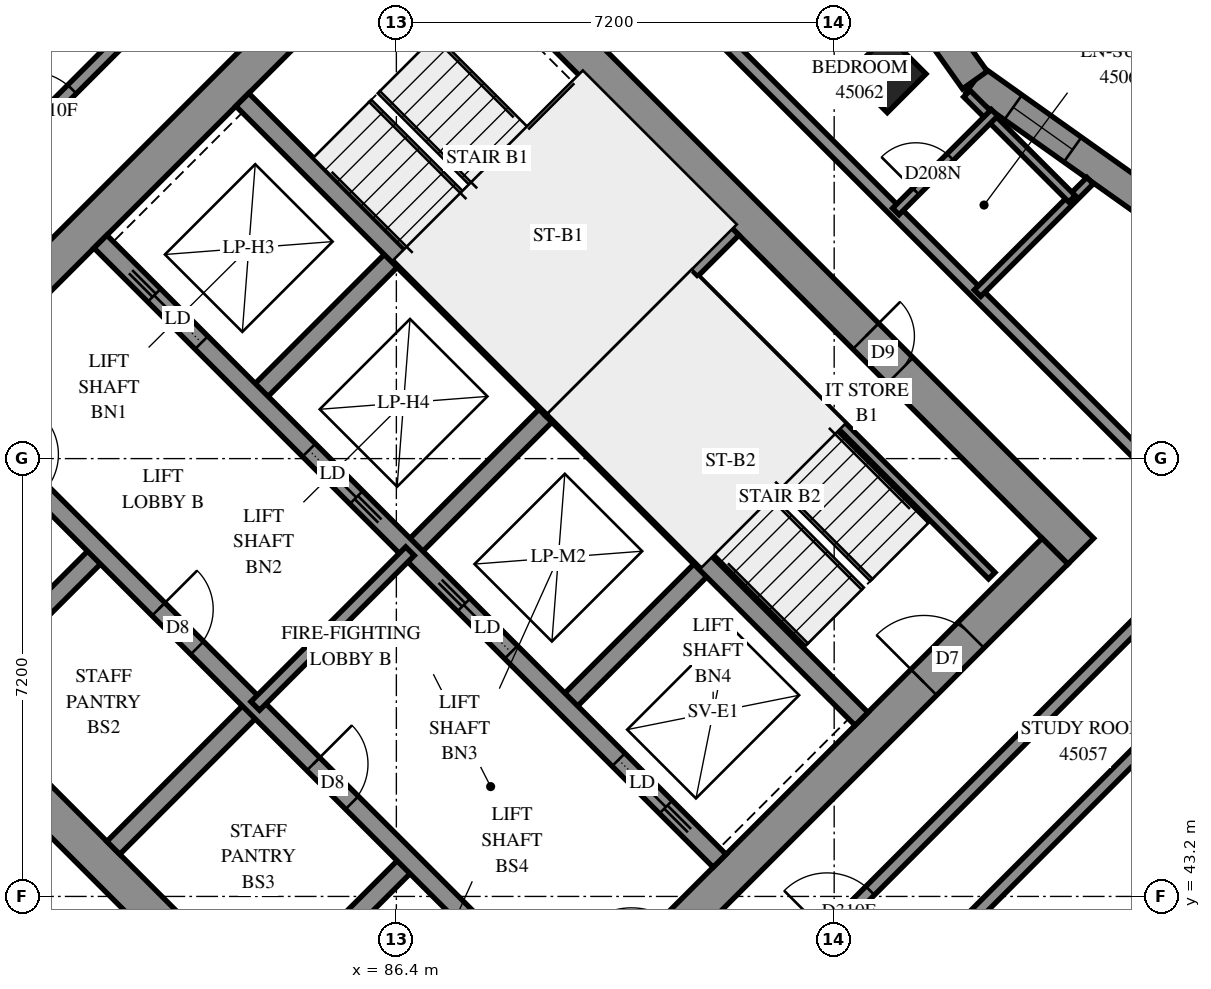
"""IFC4 building model, lengths in metres.
Left out: names, types, materials, properties, quantities, classifications, styles, units other than length and angle.
Written with IfcOpenShell. Run it as: python <this file> out.ifc"""

import sys

from ifc_helpers import new_model, si_unit, direction, frame, frame_2d, origin, origin_2d, place, context, subcontext, project, spatial, polyline, rectangle, outline, extrude, element, fill, save


model = new_model("IFC4")
c1 = context("Model", 3, precision=1e-05, world=origin(), true_north=direction((0.0, 1.0)))
c2 = subcontext(c1, "Body", "Model", "MODEL_VIEW")
j1 = project(units=[si_unit("LENGTHUNIT", "METRE"), si_unit("PLANEANGLEUNIT", "RADIAN")], contexts=[c1])
p1 = place(None, origin())
s1 = spatial("IfcSite", under=j1, at=p1, CompositionType="ELEMENT")
p2 = place(p1, origin())
s2 = spatial("IfcBuilding", under=s1, at=p2, CompositionType="ELEMENT")
p3 = place(p2, frame((0.0, 0.0, 166.0)))
s3 = spatial("IfcBuildingStorey", under=s2, at=p3, CompositionType="ELEMENT", Elevation=166.0)
p4 = place(p3, frame((94.474, 56.727, 0.0), z_axis=(0.0, 0.0, 1.0), x_axis=(0.7071067812, -0.7071067812, 0.0)))
e1 = element("IfcColumn", 1, at=p4, inside=s3, PredefinedType="COLUMN", context=c2, shape_type="SweptSolid", body=[
    extrude(rectangle(XDim=0.9, YDim=0.9, at=origin_2d()), origin(), (0.0, 0.0, 1.0), 3.1),
])
p5 = place(p3, frame((76.018, 49.302, -0.3), z_axis=(0.0, 0.0, 1.0), x_axis=(0.7071067812, -0.7071067812, 0.0)))
e2 = element("IfcWall", 2, at=p5, inside=s3, PredefinedType="SHEAR", context=c2, shape_type="SweptSolid", body=[
    extrude(rectangle(XDim=15.6, YDim=0.6, at=frame_2d((7.8, 0.0))), origin(), (0.0, 0.0, 1.0), 2.7),
])
p6 = place(p3, frame((86.625, 59.908, -0.3), z_axis=(0.0, 0.0, 1.0), x_axis=(0.7071067812, -0.7071067812, 0.0)))
e3 = element("IfcWall", 3, at=p6, inside=s3, PredefinedType="SHEAR", context=c2, shape_type="SweptSolid", body=[
    extrude(rectangle(XDim=15.6, YDim=0.6, at=frame_2d((7.8, 0.0))), origin(), (0.0, 0.0, 1.0), 2.7),
])
p7 = place(p6, frame((10.6, 0.0, 0.3)))
e4 = element("IfcOpeningElement", 4, at=p7, cuts=e3, PredefinedType="OPENING", context=c2, shape_type="SweptSolid", body=[
    extrude(rectangle(XDim=0.8, YDim=2.1, at=frame_2d((0.4, 1.05))), frame((0.0, 0.31, 0.0), z_axis=(0.0, -1.0, 0.0), x_axis=(1.0, 0.0, 0.0)), (0.0, 0.0, 1.0), 0.62),
])
p8 = place(p3, frame((76.442, 49.302, -0.3), z_axis=(0.0, 0.0, 1.0), x_axis=(0.7071067812, 0.7071067812, 0.0)))
e5 = element("IfcWall", 5, at=p8, inside=s3, PredefinedType="SHEAR", context=c2, shape_type="SweptSolid", body=[
    extrude(rectangle(XDim=14.4, YDim=0.6, at=frame_2d((7.2, 0.0))), origin(), (0.0, 0.0, 1.0), 2.7),
])
p9 = place(p8, frame((4.55, 0.0, 0.3)))
e6 = element("IfcOpeningElement", 6, at=p9, cuts=e5, PredefinedType="OPENING", context=c2, shape_type="SweptSolid", body=[
    extrude(rectangle(XDim=1.1, YDim=2.1, at=frame_2d((0.55, 1.05))), frame((0.0, 0.31, 0.0), z_axis=(0.0, -1.0, 0.0), x_axis=(1.0, 0.0, 0.0)), (0.0, 0.0, 1.0), 0.62),
])
p10 = place(p8, frame((11.35, 0.0, 0.3)))
e7 = element("IfcOpeningElement", 7, at=p10, cuts=e5, PredefinedType="OPENING", context=c2, shape_type="SweptSolid", body=[
    extrude(rectangle(XDim=1.1, YDim=2.1, at=frame_2d((0.55, 1.05))), frame((0.0, 0.31, 0.0), z_axis=(0.0, -1.0, 0.0), x_axis=(1.0, 0.0, 0.0)), (0.0, 0.0, 1.0), 0.62),
])
p11 = place(p3, frame((87.049, 38.695, -0.3), z_axis=(0.0, 0.0, 1.0), x_axis=(0.7071067812, 0.7071067812, 0.0)))
e8 = element("IfcWall", 8, at=p11, inside=s3, PredefinedType="SHEAR", context=c2, shape_type="SweptSolid", body=[
    extrude(rectangle(XDim=14.4, YDim=0.6, at=frame_2d((7.2, 0.0))), origin(), (0.0, 0.0, 1.0), 2.7),
])
p12 = place(p11, frame((4.55, 0.0, 0.3)))
e9 = element("IfcOpeningElement", 9, at=p12, cuts=e8, PredefinedType="OPENING", context=c2, shape_type="SweptSolid", body=[
    extrude(rectangle(XDim=1.1, YDim=2.1, at=frame_2d((0.55, 1.05))), frame((0.0, 0.31, 0.0), z_axis=(0.0, -1.0, 0.0), x_axis=(1.0, 0.0, 0.0)), (0.0, 0.0, 1.0), 0.62),
])
p13 = place(p11, frame((11.35, 0.0, 0.3)))
e10 = element("IfcOpeningElement", 10, at=p13, cuts=e8, PredefinedType="OPENING", context=c2, shape_type="SweptSolid", body=[
    extrude(rectangle(XDim=1.1, YDim=2.1, at=frame_2d((0.55, 1.05))), frame((0.0, 0.31, 0.0), z_axis=(0.0, -1.0, 0.0), x_axis=(1.0, 0.0, 0.0)), (0.0, 0.0, 1.0), 0.62),
])
for number, where, z_axis, x_axis in (
    (11, (79.2, 46.544, 0.0), (0.0, 0.0, 1.0), (0.707, 0.707, 0.0)),
    (12, (84.079, 51.423, 0.0), (0.0, 0.0, 1.0), (0.707, 0.707, 0.0)),
):
    element("IfcWall", number, at=place(p3, frame(where, z_axis=z_axis, x_axis=x_axis)), inside=s3, PredefinedType="SOLIDWALL", context=c2, shape_type="SweptSolid", body=[
        extrude(rectangle(XDim=3.3, YDim=0.3, at=frame_2d((1.65, 0.0))), origin(), (0.0, 0.0, 1.0), 3.1),
    ])
p14 = place(p3, frame((81.746, 43.999, 0.0), z_axis=(0.0, 0.0, 1.0), x_axis=(0.7071067812, 0.7071067812, 0.0)))
e13 = element("IfcWall", 13, at=p14, inside=s3, PredefinedType="SOLIDWALL", context=c2, shape_type="SweptSolid", body=[
    extrude(rectangle(XDim=3.3, YDim=0.3, at=frame_2d((1.65, 0.0))), origin(), (0.0, 0.0, 1.0), 3.1),
])
p15 = place(p3, frame((86.625, 48.878, 0.0), z_axis=(0.0, 0.0, 1.0), x_axis=(0.7071067812, 0.7071067812, 0.0)))
e14 = element("IfcWall", 14, at=p15, inside=s3, PredefinedType="SOLIDWALL", context=c2, shape_type="SweptSolid", body=[
    extrude(rectangle(XDim=3.3, YDim=0.3, at=frame_2d((1.65, 0.0))), origin(), (0.0, 0.0, 1.0), 3.1),
])
p16 = place(p3, frame((84.291, 41.453, 0.0), z_axis=(0.0, 0.0, 1.0), x_axis=(0.7071067812, 0.7071067812, 0.0)))
e15 = element("IfcWall", 15, at=p16, inside=s3, PredefinedType="SOLIDWALL", context=c2, shape_type="SweptSolid", body=[
    extrude(rectangle(XDim=3.3, YDim=0.3, at=frame_2d((1.65, 0.0))), origin(), (0.0, 0.0, 1.0), 3.1),
])
p17 = place(p3, frame((89.17, 46.332, 0.0), z_axis=(0.0, 0.0, 1.0), x_axis=(0.7071067812, 0.7071067812, 0.0)))
e16 = element("IfcWall", 16, at=p17, inside=s3, PredefinedType="SOLIDWALL", context=c2, shape_type="SweptSolid", body=[
    extrude(rectangle(XDim=3.3, YDim=0.3, at=frame_2d((1.65, 0.0))), origin(), (0.0, 0.0, 1.0), 3.1),
])
p18 = place(p3, frame((78.988, 51.423, 0.0), z_axis=(0.0, 0.0, 1.0), x_axis=(0.7071067812, -0.7071067812, 0.0)))
e17 = element("IfcWall", 17, at=p18, inside=s3, PredefinedType="SOLIDWALL", context=c2, shape_type="SweptSolid", body=[
    extrude(rectangle(XDim=14.4, YDim=0.3, at=frame_2d((7.2, 0.0))), origin(), (0.0, 0.0, 1.0), 3.1),
])
p19 = place(p18, frame((1.35, 0.0, 0.0)))
e18 = element("IfcOpeningElement", 18, at=p19, cuts=e17, PredefinedType="OPENING", context=c2, shape_type="SweptSolid", body=[
    extrude(rectangle(XDim=0.9, YDim=2.1, at=frame_2d((0.45, 1.05))), frame((0.0, 0.16, 0.0), z_axis=(0.0, -1.0, 0.0), x_axis=(1.0, 0.0, 0.0)), (0.0, 0.0, 1.0), 0.32),
])
p20 = place(p18, frame((4.95, 0.0, 0.0)))
e19 = element("IfcOpeningElement", 19, at=p20, cuts=e17, PredefinedType="OPENING", context=c2, shape_type="SweptSolid", body=[
    extrude(rectangle(XDim=0.9, YDim=2.1, at=frame_2d((0.45, 1.05))), frame((0.0, 0.16, 0.0), z_axis=(0.0, -1.0, 0.0), x_axis=(1.0, 0.0, 0.0)), (0.0, 0.0, 1.0), 0.32),
])
p21 = place(p18, frame((8.55, 0.0, 0.0)))
e20 = element("IfcOpeningElement", 20, at=p21, cuts=e17, PredefinedType="OPENING", context=c2, shape_type="SweptSolid", body=[
    extrude(rectangle(XDim=0.9, YDim=2.1, at=frame_2d((0.45, 1.05))), frame((0.0, 0.16, 0.0), z_axis=(0.0, -1.0, 0.0), x_axis=(1.0, 0.0, 0.0)), (0.0, 0.0, 1.0), 0.32),
])
p22 = place(p18, frame((12.05, 0.0, 0.0)))
e21 = element("IfcOpeningElement", 21, at=p22, cuts=e17, PredefinedType="OPENING", context=c2, shape_type="SweptSolid", body=[
    extrude(rectangle(XDim=1.1, YDim=2.1, at=frame_2d((0.55, 1.05))), frame((0.0, 0.16, 0.0), z_axis=(0.0, -1.0, 0.0), x_axis=(1.0, 0.0, 0.0)), (0.0, 0.0, 1.0), 0.32),
])
p23 = place(p3, frame((81.534, 53.969, 0.0), z_axis=(0.0, 0.0, 1.0), x_axis=(0.707103309, -0.7071102534, 0.0)))
e22 = element("IfcWall", 22, at=p23, inside=s3, PredefinedType="SOLIDWALL", context=c2, shape_type="SweptSolid", body=[
    extrude(rectangle(XDim=14.4, YDim=0.3, at=frame_2d((7.2, 0.0))), origin(), (0.0, 0.0, 1.0), 3.1),
])
p24 = place(p23, frame((1.25, 0.0, 0.0)))
e23 = element("IfcOpeningElement", 23, at=p24, cuts=e22, PredefinedType="OPENING", context=c2, shape_type="SweptSolid", body=[
    extrude(rectangle(XDim=1.1, YDim=2.1, at=frame_2d((0.55, 1.05))), frame((0.0, 0.16, 0.0), z_axis=(0.0, -1.0, 0.0), x_axis=(1.0, 0.0, 0.0)), (0.0, 0.0, 1.0), 0.32),
])
p25 = place(p23, frame((4.85, 0.0, 0.0)))
e24 = element("IfcOpeningElement", 24, at=p25, cuts=e22, PredefinedType="OPENING", context=c2, shape_type="SweptSolid", body=[
    extrude(rectangle(XDim=1.1, YDim=2.1, at=frame_2d((0.55, 1.05))), frame((0.0, 0.16, 0.0), z_axis=(0.0, -1.0, 0.0), x_axis=(1.0, 0.0, 0.0)), (0.0, 0.0, 1.0), 0.32),
])
p26 = place(p23, frame((8.45, 0.0, 0.0)))
e25 = element("IfcOpeningElement", 25, at=p26, cuts=e22, PredefinedType="OPENING", context=c2, shape_type="SweptSolid", body=[
    extrude(rectangle(XDim=1.1, YDim=2.1, at=frame_2d((0.55, 1.05))), frame((0.0, 0.16, 0.0), z_axis=(0.0, -1.0, 0.0), x_axis=(1.0, 0.0, 0.0)), (0.0, 0.0, 1.0), 0.32),
])
p27 = place(p23, frame((12.05, 0.0, 0.0)))
e26 = element("IfcOpeningElement", 26, at=p27, cuts=e22, PredefinedType="OPENING", context=c2, shape_type="SweptSolid", body=[
    extrude(rectangle(XDim=1.1, YDim=2.1, at=frame_2d((0.55, 1.05))), frame((0.0, 0.16, 0.0), z_axis=(0.0, -1.0, 0.0), x_axis=(1.0, 0.0, 0.0)), (0.0, 0.0, 1.0), 0.32),
])
for number, where, z_axis, x_axis in (
    (27, (83.867, 56.302, 0.0), (0.0, 0.0, 1.0), (0.707, -0.707, 0.0)),
    (28, (88.958, 51.211, 0.0), (0.0, 0.0, 1.0), (0.707, -0.707, 0.0)),
):
    element("IfcWall", number, at=place(p3, frame(where, z_axis=z_axis, x_axis=x_axis)), inside=s3, PredefinedType="SOLIDWALL", context=c2, shape_type="SweptSolid", body=[
        extrude(rectangle(XDim=7.2, YDim=0.3, at=frame_2d((3.6, 0.0))), origin(), (0.0, 0.0, 1.0), 3.1),
    ])
p28 = place(p3, frame((88.958, 51.211, 0.0), z_axis=(0.0, 0.0, 1.0), x_axis=(0.7071067812, 0.7071067812, 0.0)))
e29 = element("IfcWall", 29, at=p28, inside=s3, PredefinedType="SOLIDWALL", context=c2, shape_type="SweptSolid", body=[
    extrude(rectangle(XDim=4.2, YDim=0.3, at=frame_2d((2.1, 0.0))), origin(), (0.0, 0.0, 1.0), 3.1),
])
p29 = place(p3, frame((98.71, 54.638, 0.0), z_axis=(0.0, 0.0, 1.0), x_axis=(-0.8151376585, 0.5792672938, 0.0)))
e30 = element("IfcWall", 30, at=p29, inside=s3, PredefinedType="SOLIDWALL", context=c2, shape_type="SweptSolid", body=[
    extrude(outline(polyline([(-0.042, -0.25), (3.388, -0.25), (3.472, 0.25), (0.042, 0.25), (-0.042, -0.25)])), origin(), (0.0, 0.0, 1.0), 3.1),
])
p30 = place(p29, frame((1.457, 0.0, 0.45)))
e31 = element("IfcOpeningElement", 31, at=p30, cuts=e30, PredefinedType="OPENING", context=c2, shape_type="SweptSolid", body=[
    extrude(rectangle(XDim=1.2, YDim=2.5, at=frame_2d((0.6, 1.25))), frame((0.0, 0.26, 0.0), z_axis=(0.0, -1.0, 0.0), x_axis=(1.0, 0.0, 0.0)), (0.0, 0.0, 1.0), 0.52),
])
p31 = place(p3, frame((95.914, 56.624, 0.0), z_axis=(0.0, 0.0, 1.0), x_axis=(-0.5792728992, 0.8151336751, 0.0)))
e32 = element("IfcWall", 32, at=p31, inside=s3, PredefinedType="SOLIDWALL", context=c2, shape_type="SweptSolid", body=[
    extrude(outline(polyline([(0.042, -0.25), (3.472, -0.25), (3.388, 0.25), (-0.042, 0.25), (0.042, -0.25)])), origin(), (0.0, 0.0, 1.0), 3.1),
])
p32 = place(p31, frame((1.547, 0.0, 0.45)))
e33 = element("IfcOpeningElement", 33, at=p32, cuts=e32, PredefinedType="OPENING", context=c2, shape_type="SweptSolid", body=[
    extrude(rectangle(XDim=1.2, YDim=2.5, at=frame_2d((0.6, 1.25))), frame((0.0, 0.26, 0.0), z_axis=(0.0, -1.0, 0.0), x_axis=(1.0, 0.0, 0.0)), (0.0, 0.0, 1.0), 0.52),
])
p33 = place(p3, frame((91.313, 53.354, 0.0), z_axis=(0.0, 0.0, 1.0), x_axis=(0.7071140275, -0.7070995348, 0.0)))
e34 = element("IfcWall", 34, at=p33, inside=s3, PredefinedType="PARTITIONING", context=c2, shape_type="SweptSolid", body=[
    extrude(rectangle(XDim=6.9, YDim=0.15, at=frame_2d((3.45, 0.0))), origin(), (0.0, 0.0, 1.0), 3.1),
])
p34 = place(p3, frame((84.079, 46.332, 0.0), z_axis=(0.0, 0.0, 1.0), x_axis=(0.7071067812, 0.7071067812, 0.0)))
e35 = element("IfcWall", 35, at=p34, inside=s3, PredefinedType="PARTITIONING", context=c2, shape_type="SweptSolid", body=[
    extrude(rectangle(XDim=3.6, YDim=0.2, at=frame_2d((1.8, 0.0))), origin(), (0.0, 0.0, 1.0), 3.1),
])
p35 = place(p3, frame((94.366, 41.348, 0.0), z_axis=(0.0, 0.0, 1.0), x_axis=(0.7071108994, 0.707102663, 0.0)))
e36 = element("IfcWall", 36, at=p35, inside=s3, PredefinedType="PARTITIONING", context=c2, shape_type="SweptSolid", body=[
    extrude(rectangle(XDim=12.141, YDim=0.2, at=frame_2d((6.071, 0.0))), origin(), (0.0, 0.0, 1.0), 3.1),
])
p36 = place(p3, frame((91.755, 57.317, 0.0), z_axis=(0.0, 0.0, 1.0), x_axis=(0.7071067812, -0.7071067812, 0.0)))
e37 = element("IfcWall", 37, at=p36, inside=s3, PredefinedType="PARTITIONING", context=c2, shape_type="SweptSolid", body=[
    extrude(rectangle(XDim=11.639, YDim=0.2, at=frame_2d((5.819, 0.0))), origin(), (0.0, 0.0, 1.0), 3.1),
])
p37 = place(p3, frame((80.154, 55.56, 0.0), z_axis=(0.0, 0.0, 1.0), x_axis=(0.7071067812, 0.7071067812, 0.0)))
e38 = element("IfcWall", 38, at=p37, inside=s3, PredefinedType="PARTITIONING", context=c2, shape_type="SweptSolid", body=[
    extrude(rectangle(XDim=9.45, YDim=0.2, at=frame_2d((4.725, 0.0))), origin(), (0.0, 0.0, 1.0), 3.1),
])
p38 = place(p37, frame((0.292, 0.0, 0.0)))
e39 = element("IfcOpeningElement", 39, at=p38, cuts=e38, PredefinedType="OPENING", context=c2, shape_type="SweptSolid", body=[
    extrude(rectangle(XDim=1.0, YDim=2.1, at=frame_2d((0.5, 1.05))), frame((0.0, 0.11, 0.0), z_axis=(0.0, -1.0, 0.0), x_axis=(1.0, 0.0, 0.0)), (0.0, 0.0, 1.0), 0.22),
])
p39 = place(p3, frame((93.306, 42.408, 0.0), z_axis=(0.0, 0.0, 1.0), x_axis=(0.7071067812, 0.7071067812, 0.0)))
e40 = element("IfcWall", 40, at=p39, inside=s3, PredefinedType="PARTITIONING", context=c2, shape_type="SweptSolid", body=[
    extrude(rectangle(XDim=9.45, YDim=0.2, at=frame_2d((4.725, 0.0))), origin(), (0.0, 0.0, 1.0), 3.1),
])
p40 = place(p39, frame((0.253, 0.0, 0.0)))
e41 = element("IfcOpeningElement", 41, at=p40, cuts=e40, PredefinedType="OPENING", context=c2, shape_type="SweptSolid", body=[
    extrude(rectangle(XDim=1.0, YDim=2.1, at=frame_2d((0.5, 1.05))), frame((0.0, 0.11, 0.0), z_axis=(0.0, -1.0, 0.0), x_axis=(1.0, 0.0, 0.0)), (0.0, 0.0, 1.0), 0.22),
])
p41 = place(p3, frame((95.957, 53.121, 0.0), z_axis=(0.0, 0.0, 1.0), x_axis=(0.7070876797, 0.7071258821, 0.0)))
e42 = element("IfcWall", 42, at=p41, inside=s3, PredefinedType="PARTITIONING", context=c2, shape_type="SweptSolid", body=[
    extrude(rectangle(XDim=2.618, YDim=0.15, at=frame_2d((1.309, 0.0))), origin(), (0.0, 0.0, 1.0), 3.1),
])
p42 = place(p3, frame((95.782, 56.401, 0.0), z_axis=(0.0, 0.0, 1.0), x_axis=(0.707127237, -0.7070863248, 0.0)))
e43 = element("IfcWall", 43, at=p42, inside=s3, PredefinedType="PARTITIONING", context=c2, shape_type="SweptSolid", body=[
    extrude(rectangle(XDim=2.444, YDim=0.15, at=frame_2d((1.222, 0.0))), origin(), (0.0, 0.0, 1.0), 3.1),
])
p43 = place(p3, frame((94.614, 54.464, 0.0), z_axis=(0.0, 0.0, 1.0), x_axis=(0.7071067812, 0.7071067812, 0.0)))
e44 = element("IfcWall", 44, at=p43, inside=s3, PredefinedType="PARTITIONING", context=c2, shape_type="SweptSolid", body=[
    extrude(rectangle(XDim=2.296, YDim=0.15, at=frame_2d((1.148, 0.0))), origin(), (0.0, 0.0, 1.0), 3.1),
])
p44 = place(p43, frame((0.466, 0.0, 0.0)))
e45 = element("IfcOpeningElement", 45, at=p44, cuts=e44, PredefinedType="OPENING", context=c2, shape_type="SweptSolid", body=[
    extrude(rectangle(XDim=0.8, YDim=2.1, at=frame_2d((0.4, 1.05))), frame((0.0, 0.085, 0.0), z_axis=(0.0, -1.0, 0.0), x_axis=(1.0, 0.0, 0.0)), (0.0, 0.0, 1.0), 0.17),
])
p45 = place(p30, origin())
e46 = element("IfcWindow", 46, at=p45, inside=s3, PartitioningType="SINGLE_PANEL", PredefinedType="WINDOW", context=c2, shape_type="SweptSolid", body=[
    extrude(rectangle(XDim=1.2, YDim=2.5, at=frame_2d((0.6, 1.25))), frame((0.0, 0.18, 0.0), z_axis=(0.0, -1.0, 0.0), x_axis=(1.0, 0.0, 0.0)), (0.0, 0.0, 1.0), 0.06),
])
fill(e31, e46)
p46 = place(p7, origin())
e47 = element("IfcDoor", 47, at=p46, inside=s3, OperationType="SINGLE_SWING_RIGHT", PredefinedType="DOOR", context=c2, shape_type="SweptSolid", body=[
    extrude(rectangle(XDim=0.8, YDim=2.1, at=frame_2d((0.4, 1.05))), frame((0.0, 0.025, 0.0), z_axis=(0.0, -1.0, 0.0), x_axis=(1.0, 0.0, 0.0)), (0.0, 0.0, 1.0), 0.05),
])
fill(e4, e47)
p47 = place(p13, origin())
e48 = element("IfcDoor", 48, at=p47, inside=s3, OperationType="SINGLE_SWING_RIGHT", PredefinedType="DOOR", context=c2, shape_type="SweptSolid", body=[
    extrude(rectangle(XDim=1.1, YDim=2.1, at=frame_2d((0.55, 1.05))), frame((0.0, 0.025, 0.0), z_axis=(0.0, -1.0, 0.0), x_axis=(1.0, 0.0, 0.0)), (0.0, 0.0, 1.0), 0.05),
])
fill(e10, e48)
p48 = place(p20, origin())
e49 = element("IfcDoor", 49, at=p48, inside=s3, OperationType="SINGLE_SWING_LEFT", PredefinedType="DOOR", context=c2, shape_type="SweptSolid", body=[
    extrude(rectangle(XDim=0.9, YDim=2.1, at=frame_2d((0.45, 1.05))), frame((0.0, 0.025, 0.0), z_axis=(0.0, -1.0, 0.0), x_axis=(1.0, 0.0, 0.0)), (0.0, 0.0, 1.0), 0.05),
])
fill(e19, e49)
p49 = place(p21, origin())
e50 = element("IfcDoor", 50, at=p49, inside=s3, OperationType="SINGLE_SWING_LEFT", PredefinedType="DOOR", context=c2, shape_type="SweptSolid", body=[
    extrude(rectangle(XDim=0.9, YDim=2.1, at=frame_2d((0.45, 1.05))), frame((0.0, 0.025, 0.0), z_axis=(0.0, -1.0, 0.0), x_axis=(1.0, 0.0, 0.0)), (0.0, 0.0, 1.0), 0.05),
])
fill(e20, e50)
p50 = place(p24, origin())
e51 = element("IfcDoor", 51, at=p50, inside=s3, OperationType="SLIDING_TO_LEFT", PredefinedType="DOOR", context=c2, shape_type="SweptSolid", body=[
    extrude(rectangle(XDim=1.1, YDim=2.1, at=frame_2d((0.55, 1.05))), frame((0.0, 0.025, 0.0), z_axis=(0.0, -1.0, 0.0), x_axis=(1.0, 0.0, 0.0)), (0.0, 0.0, 1.0), 0.05),
])
fill(e23, e51)
p51 = place(p25, origin())
e52 = element("IfcDoor", 52, at=p51, inside=s3, OperationType="SLIDING_TO_RIGHT", PredefinedType="DOOR", context=c2, shape_type="SweptSolid", body=[
    extrude(rectangle(XDim=1.1, YDim=2.1, at=frame_2d((0.55, 1.05))), frame((0.0, 0.025, 0.0), z_axis=(0.0, -1.0, 0.0), x_axis=(1.0, 0.0, 0.0)), (0.0, 0.0, 1.0), 0.05),
])
fill(e24, e52)
p52 = place(p26, origin())
e53 = element("IfcDoor", 53, at=p52, inside=s3, OperationType="SLIDING_TO_LEFT", PredefinedType="DOOR", context=c2, shape_type="SweptSolid", body=[
    extrude(rectangle(XDim=1.1, YDim=2.1, at=frame_2d((0.55, 1.05))), frame((0.0, 0.025, 0.0), z_axis=(0.0, -1.0, 0.0), x_axis=(1.0, 0.0, 0.0)), (0.0, 0.0, 1.0), 0.05),
])
fill(e25, e53)
p53 = place(p27, origin())
e54 = element("IfcDoor", 54, at=p53, inside=s3, OperationType="SLIDING_TO_RIGHT", PredefinedType="DOOR", context=c2, shape_type="SweptSolid", body=[
    extrude(rectangle(XDim=1.1, YDim=2.1, at=frame_2d((0.55, 1.05))), frame((0.0, 0.025, 0.0), z_axis=(0.0, -1.0, 0.0), x_axis=(1.0, 0.0, 0.0)), (0.0, 0.0, 1.0), 0.05),
])
fill(e26, e54)
p54 = place(p38, origin())
e55 = element("IfcDoor", 55, at=p54, inside=s3, OperationType="SINGLE_SWING_LEFT", PredefinedType="DOOR", context=c2, shape_type="SweptSolid", body=[
    extrude(rectangle(XDim=1.0, YDim=2.1, at=frame_2d((0.5, 1.05))), frame((0.0, 0.025, 0.0), z_axis=(0.0, -1.0, 0.0), x_axis=(1.0, 0.0, 0.0)), (0.0, 0.0, 1.0), 0.05),
])
fill(e39, e55)
p55 = place(p40, origin())
e56 = element("IfcDoor", 56, at=p55, inside=s3, OperationType="SINGLE_SWING_RIGHT", PredefinedType="DOOR", context=c2, shape_type="SweptSolid", body=[
    extrude(rectangle(XDim=1.0, YDim=2.1, at=frame_2d((0.5, 1.05))), frame((0.0, 0.025, 0.0), z_axis=(0.0, -1.0, 0.0), x_axis=(1.0, 0.0, 0.0)), (0.0, 0.0, 1.0), 0.05),
])
fill(e41, e56)
p56 = place(p44, origin())
e57 = element("IfcDoor", 57, at=p56, inside=s3, OperationType="SINGLE_SWING_RIGHT", PredefinedType="DOOR", context=c2, shape_type="SweptSolid", body=[
    extrude(rectangle(XDim=0.8, YDim=2.1, at=frame_2d((0.4, 1.05))), frame((0.0, 0.025, 0.0), z_axis=(0.0, -1.0, 0.0), x_axis=(1.0, 0.0, 0.0)), (0.0, 0.0, 1.0), 0.05),
])
fill(e45, e57)
save(model, sys.argv[1])
